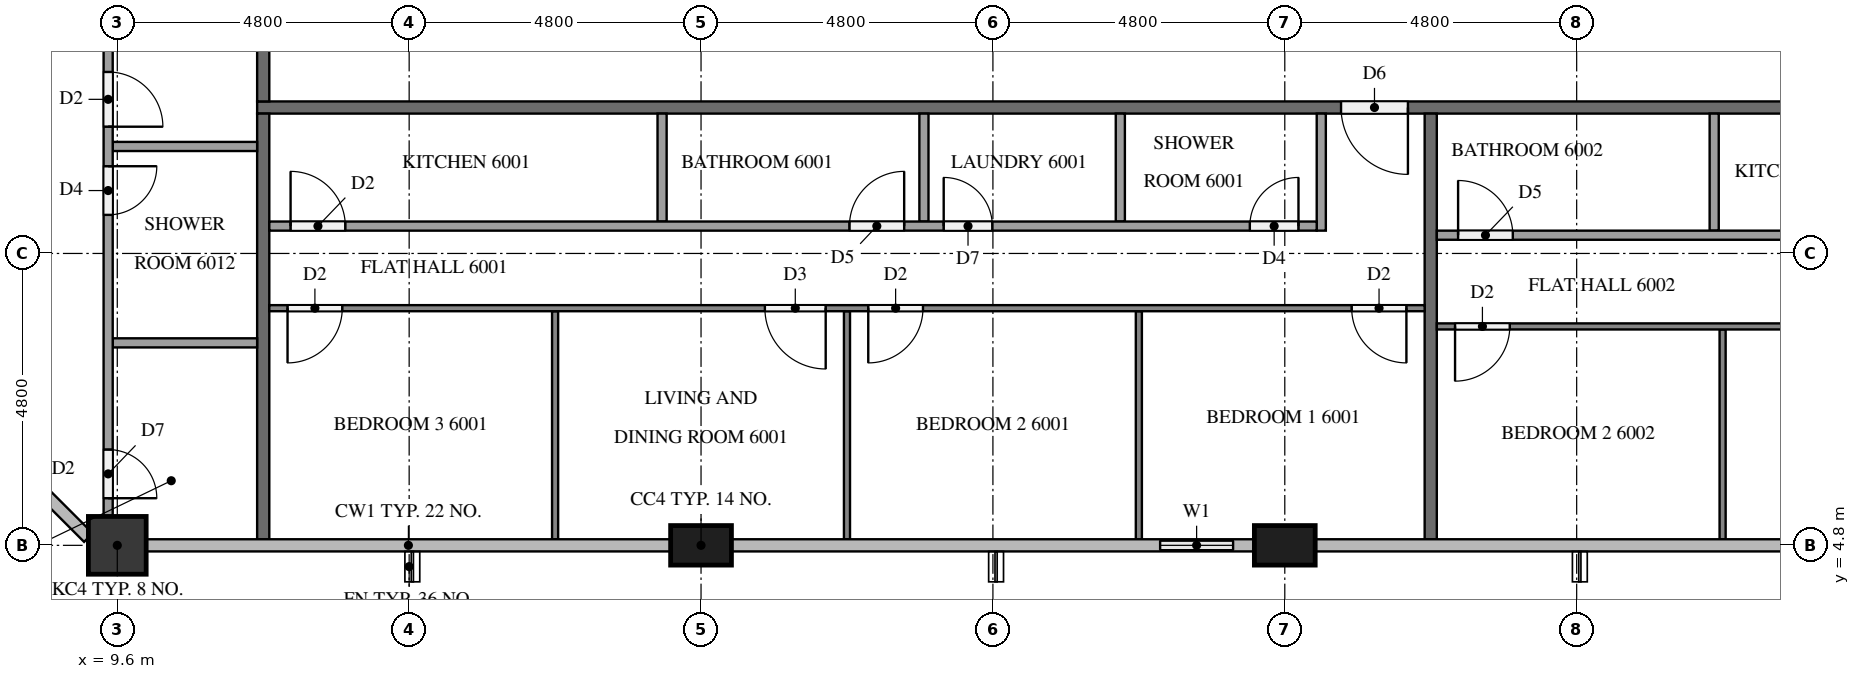
"""IFC4 building model, lengths in metres.
Left out: names, types, materials, properties, quantities, classifications, styles, units other than length and angle.
Written with IfcOpenShell. Run it as: python <this file> out.ifc"""

import sys

from ifc_helpers import new_model, si_unit, direction, frame, frame_2d, origin, origin_2d, place, context, subcontext, project, spatial, rectangle, extrude, element, fill, save


model = new_model("IFC4")
c1 = context("Model", 3, precision=1e-05, world=origin(), true_north=direction((0.0, 1.0)))
c2 = subcontext(c1, "Body", "Model", "MODEL_VIEW")
j1 = project(units=[si_unit("LENGTHUNIT", "METRE"), si_unit("PLANEANGLEUNIT", "RADIAN")], contexts=[c1])
p1 = place(None, origin())
s1 = spatial("IfcSite", under=j1, at=p1, CompositionType="ELEMENT")
p2 = place(p1, origin())
s2 = spatial("IfcBuilding", under=s1, at=p2, CompositionType="ELEMENT")
p3 = place(p2, frame((0.0, 0.0, 229.8)))
s3 = spatial("IfcBuildingStorey", under=s2, at=p3, CompositionType="ELEMENT", Elevation=229.8)
p4 = place(p3, frame((9.6, 4.8, 0.0), z_axis=(0.0, 0.0, 1.0), x_axis=(1.0, 0.0, 0.0)))
e1 = element("IfcColumn", 1, at=p4, inside=s3, PredefinedType="COLUMN", context=c2, shape_type="SweptSolid", body=[
    extrude(rectangle(XDim=0.95, YDim=0.95, at=origin_2d()), origin(), (0.0, 0.0, 1.0), 3.1),
])
for number, where, z_axis, x_axis in (
    (2, (19.2, 4.8, 0.0), (0.0, 0.0, 1.0), (1.0, 0.0, 0.0)),
    (3, (28.8, 4.8, 0.0), (0.0, 0.0, 1.0), (1.0, 0.0, 0.0)),
):
    element("IfcColumn", number, at=place(p3, frame(where, z_axis=z_axis, x_axis=x_axis)), inside=s3, PredefinedType="COLUMN", context=c2, shape_type="SweptSolid", body=[
        extrude(rectangle(XDim=1.0, YDim=0.65, at=origin_2d()), origin(), (0.0, 0.0, 1.0), 3.1),
    ])
p5 = place(p3, frame((26.4, 4.8, 0.0), z_axis=(0.0, 0.0, 1.0), x_axis=(1.0, 0.0, 0.0)))
e4 = element("IfcWall", 4, at=p5, inside=s3, PredefinedType="SOLIDWALL", context=c2, shape_type="SweptSolid", body=[
    extrude(rectangle(XDim=1.9, YDim=0.15, at=frame_2d((0.95, 0.0))), origin(), (0.0, 0.0, 1.0), 3.1),
])
p6 = place(p5, frame((0.35, 0.0, 0.9)))
e5 = element("IfcOpeningElement", 5, at=p6, cuts=e4, PredefinedType="OPENING", context=c2, shape_type="SweptSolid", body=[
    extrude(rectangle(XDim=1.2, YDim=1.4, at=frame_2d((0.6, 0.7))), frame((0.0, 0.085, 0.0), z_axis=(0.0, -1.0, 0.0), x_axis=(1.0, 0.0, 0.0)), (0.0, 0.0, 1.0), 0.17),
])
p7 = place(p3, frame((50.5, 12.0, 0.0), z_axis=(0.0, 0.0, 1.0), x_axis=(-1.0, 0.0, 0.0)))
e6 = element("IfcWall", 6, at=p7, inside=s3, PredefinedType="PARTITIONING", context=c2, shape_type="SweptSolid", body=[
    extrude(rectangle(XDim=38.6, YDim=0.2, at=frame_2d((19.3, 0.0))), origin(), (0.0, 0.0, 1.0), 3.1),
])
p8 = place(p7, frame((19.675, 0.0, 0.0)))
e7 = element("IfcOpeningElement", 7, at=p8, cuts=e6, PredefinedType="OPENING", context=c2, shape_type="SweptSolid", body=[
    extrude(rectangle(XDim=1.1, YDim=2.1, at=frame_2d((0.55, 1.05))), frame((0.0, 0.11, 0.0), z_axis=(0.0, -1.0, 0.0), x_axis=(1.0, 0.0, 0.0)), (0.0, 0.0, 1.0), 0.22),
])
p9 = place(p7, frame((2.925, 0.0, 0.0)))
e8 = element("IfcOpeningElement", 8, at=p9, cuts=e6, PredefinedType="OPENING", context=c2, shape_type="SweptSolid", body=[
    extrude(rectangle(XDim=1.0, YDim=2.1, at=frame_2d((0.5, 1.05))), frame((0.0, 0.11, 0.0), z_axis=(0.0, -1.0, 0.0), x_axis=(1.0, 0.0, 0.0)), (0.0, 0.0, 1.0), 0.22),
])
p10 = place(p7, frame((1.075, 0.0, 0.0)))
e9 = element("IfcOpeningElement", 9, at=p10, cuts=e6, PredefinedType="OPENING", context=c2, shape_type="SweptSolid", body=[
    extrude(rectangle(XDim=1.0, YDim=2.1, at=frame_2d((0.5, 1.05))), frame((0.0, 0.11, 0.0), z_axis=(0.0, -1.0, 0.0), x_axis=(1.0, 0.0, 0.0)), (0.0, 0.0, 1.0), 0.22),
])
p11 = place(p3, frame((12.0, 12.1, 0.0), z_axis=(0.0, 0.0, 1.0), x_axis=(0.0, 1.0, 0.0)))
e10 = element("IfcWall", 10, at=p11, inside=s3, PredefinedType="PARTITIONING", context=c2, shape_type="SweptSolid", body=[
    extrude(rectangle(XDim=28.6, YDim=0.2, at=frame_2d((14.3, 0.0))), origin(), (0.0, 0.0, 1.0), 3.1),
])
p12 = place(p11, frame((27.275, 0.0, 0.0)))
e11 = element("IfcOpeningElement", 11, at=p12, cuts=e10, PredefinedType="OPENING", context=c2, shape_type="SweptSolid", body=[
    extrude(rectangle(XDim=1.0, YDim=2.1, at=frame_2d((0.5, 1.05))), frame((0.0, 0.11, 0.0), z_axis=(0.0, -1.0, 0.0), x_axis=(1.0, 0.0, 0.0)), (0.0, 0.0, 1.0), 0.22),
])
p13 = place(p11, frame((20.075, 0.0, 0.0)))
e12 = element("IfcOpeningElement", 12, at=p13, cuts=e10, PredefinedType="OPENING", context=c2, shape_type="SweptSolid", body=[
    extrude(rectangle(XDim=1.0, YDim=2.1, at=frame_2d((0.5, 1.05))), frame((0.0, 0.11, 0.0), z_axis=(0.0, -1.0, 0.0), x_axis=(1.0, 0.0, 0.0)), (0.0, 0.0, 1.0), 0.22),
])
p14 = place(p11, frame((10.425, 0.0, 0.0)))
e13 = element("IfcOpeningElement", 13, at=p14, cuts=e10, PredefinedType="OPENING", context=c2, shape_type="SweptSolid", body=[
    extrude(rectangle(XDim=1.1, YDim=2.1, at=frame_2d((0.55, 1.05))), frame((0.0, 0.11, 0.0), z_axis=(0.0, -1.0, 0.0), x_axis=(1.0, 0.0, 0.0)), (0.0, 0.0, 1.0), 0.22),
])
for number, where, z_axis, x_axis in (
    (14, (31.2, 11.9, 0.0), (0.0, 0.0, 1.0), (0.0, -1.0, 0.0)),
    (15, (12.0, 4.9, 0.0), (0.0, 0.0, 1.0), (0.0, 1.0, 0.0)),
):
    element("IfcWall", number, at=place(p3, frame(where, z_axis=z_axis, x_axis=x_axis)), inside=s3, PredefinedType="PARTITIONING", context=c2, shape_type="SweptSolid", body=[
        extrude(rectangle(XDim=7.0, YDim=0.2, at=frame_2d((3.5, 0.0))), origin(), (0.0, 0.0, 1.0), 3.1),
    ])
for number, where, z_axis, x_axis in (
    (16, (26.4, 8.65, 0.0), (0.0, 0.0, 1.0), (0.0, -1.0, 0.0)),
    (17, (21.6, 8.65, 0.0), (0.0, 0.0, 1.0), (0.0, -1.0, 0.0)),
    (18, (16.8, 8.65, 0.0), (0.0, 0.0, 1.0), (0.0, -1.0, 0.0)),
):
    element("IfcWall", number, at=place(p3, frame(where, z_axis=z_axis, x_axis=x_axis)), inside=s3, PredefinedType="PARTITIONING", context=c2, shape_type="SweptSolid", body=[
        extrude(rectangle(XDim=3.75, YDim=0.1, at=frame_2d((1.875, 0.0))), origin(), (0.0, 0.0, 1.0), 3.1),
    ])
p15 = place(p3, frame((31.1, 8.7, 0.0), z_axis=(0.0, 0.0, 1.0), x_axis=(-1.0, 0.0, 0.0)))
e19 = element("IfcWall", 19, at=p15, inside=s3, PredefinedType="PARTITIONING", context=c2, shape_type="SweptSolid", body=[
    extrude(rectangle(XDim=19.0, YDim=0.1, at=frame_2d((9.5, 0.0))), origin(), (0.0, 0.0, 1.0), 3.1),
])
p16 = place(p15, frame((0.3, 0.0, 0.0)))
e20 = element("IfcOpeningElement", 20, at=p16, cuts=e19, PredefinedType="OPENING", context=c2, shape_type="SweptSolid", body=[
    extrude(rectangle(XDim=0.9, YDim=2.1, at=frame_2d((0.45, 1.05))), frame((0.0, 0.06, 0.0), z_axis=(0.0, -1.0, 0.0), x_axis=(1.0, 0.0, 0.0)), (0.0, 0.0, 1.0), 0.12),
])
p17 = place(p15, frame((8.25, 0.0, 0.0)))
e21 = element("IfcOpeningElement", 21, at=p17, cuts=e19, PredefinedType="OPENING", context=c2, shape_type="SweptSolid", body=[
    extrude(rectangle(XDim=0.9, YDim=2.1, at=frame_2d((0.45, 1.05))), frame((0.0, 0.06, 0.0), z_axis=(0.0, -1.0, 0.0), x_axis=(1.0, 0.0, 0.0)), (0.0, 0.0, 1.0), 0.12),
])
p18 = place(p15, frame((9.85, 0.0, 0.0)))
e22 = element("IfcOpeningElement", 22, at=p18, cuts=e19, PredefinedType="OPENING", context=c2, shape_type="SweptSolid", body=[
    extrude(rectangle(XDim=1.0, YDim=2.1, at=frame_2d((0.5, 1.05))), frame((0.0, 0.06, 0.0), z_axis=(0.0, -1.0, 0.0), x_axis=(1.0, 0.0, 0.0)), (0.0, 0.0, 1.0), 0.12),
])
p19 = place(p15, frame((17.8, 0.0, 0.0)))
e23 = element("IfcOpeningElement", 23, at=p19, cuts=e19, PredefinedType="OPENING", context=c2, shape_type="SweptSolid", body=[
    extrude(rectangle(XDim=0.9, YDim=2.1, at=frame_2d((0.45, 1.05))), frame((0.0, 0.06, 0.0), z_axis=(0.0, -1.0, 0.0), x_axis=(1.0, 0.0, 0.0)), (0.0, 0.0, 1.0), 0.12),
])
for number, where, z_axis, x_axis in (
    (24, (26.095, 11.9, 0.0), (0.0, 0.0, 1.0), (0.0, -1.0, 0.0)),
    (25, (22.865, 11.9, 0.0), (0.0, 0.0, 1.0), (0.0, -1.0, 0.0)),
    (26, (18.559, 11.9, 0.0), (0.0, 0.0, 1.0), (0.0, -1.0, 0.0)),
):
    element("IfcWall", number, at=place(p3, frame(where, z_axis=z_axis, x_axis=x_axis)), inside=s3, PredefinedType="PARTITIONING", context=c2, shape_type="SweptSolid", body=[
        extrude(rectangle(XDim=1.775, YDim=0.15, at=frame_2d((0.887, 0.0))), origin(), (0.0, 0.0, 1.0), 3.1),
    ])
p20 = place(p3, frame((29.4, 11.9, 0.0), z_axis=(0.0, 0.0, 1.0), x_axis=(0.0, -1.0, 0.0)))
e27 = element("IfcWall", 27, at=p20, inside=s3, PredefinedType="PARTITIONING", context=c2, shape_type="SweptSolid", body=[
    extrude(rectangle(XDim=1.925, YDim=0.15, at=frame_2d((0.962, 0.0))), origin(), (0.0, 0.0, 1.0), 3.1),
])
p21 = place(p3, frame((12.1, 10.05, 0.0), z_axis=(0.0, 0.0, 1.0), x_axis=(1.0, 0.0, 0.0)))
e28 = element("IfcWall", 28, at=p21, inside=s3, PredefinedType="PARTITIONING", context=c2, shape_type="SweptSolid", body=[
    extrude(rectangle(XDim=17.225, YDim=0.15, at=frame_2d((8.612, 0.0))), origin(), (0.0, 0.0, 1.0), 3.1),
])
p22 = place(p21, frame((16.125, 0.0, 0.0)))
e29 = element("IfcOpeningElement", 29, at=p22, cuts=e28, PredefinedType="OPENING", context=c2, shape_type="SweptSolid", body=[
    extrude(rectangle(XDim=0.8, YDim=2.1, at=frame_2d((0.4, 1.05))), frame((0.0, 0.085, 0.0), z_axis=(0.0, -1.0, 0.0), x_axis=(1.0, 0.0, 0.0)), (0.0, 0.0, 1.0), 0.17),
])
p23 = place(p21, frame((11.091, 0.0, 0.0)))
e30 = element("IfcOpeningElement", 30, at=p23, cuts=e28, PredefinedType="OPENING", context=c2, shape_type="SweptSolid", body=[
    extrude(rectangle(XDim=0.8, YDim=2.1, at=frame_2d((0.4, 1.05))), frame((0.0, 0.085, 0.0), z_axis=(0.0, -1.0, 0.0), x_axis=(1.0, 0.0, 0.0)), (0.0, 0.0, 1.0), 0.17),
])
p24 = place(p21, frame((9.541, 0.0, 0.0)))
e31 = element("IfcOpeningElement", 31, at=p24, cuts=e28, PredefinedType="OPENING", context=c2, shape_type="SweptSolid", body=[
    extrude(rectangle(XDim=0.9, YDim=2.1, at=frame_2d((0.45, 1.05))), frame((0.0, 0.085, 0.0), z_axis=(0.0, -1.0, 0.0), x_axis=(1.0, 0.0, 0.0)), (0.0, 0.0, 1.0), 0.17),
])
p25 = place(p21, frame((0.35, 0.0, 0.0)))
e32 = element("IfcOpeningElement", 32, at=p25, cuts=e28, PredefinedType="OPENING", context=c2, shape_type="SweptSolid", body=[
    extrude(rectangle(XDim=0.9, YDim=2.1, at=frame_2d((0.45, 1.05))), frame((0.0, 0.085, 0.0), z_axis=(0.0, -1.0, 0.0), x_axis=(1.0, 0.0, 0.0)), (0.0, 0.0, 1.0), 0.17),
])
p26 = place(p3, frame((36.0, 8.35, 0.0), z_axis=(0.0, 0.0, 1.0), x_axis=(0.0, -1.0, 0.0)))
e33 = element("IfcWall", 33, at=p26, inside=s3, PredefinedType="PARTITIONING", context=c2, shape_type="SweptSolid", body=[
    extrude(rectangle(XDim=3.45, YDim=0.1, at=frame_2d((1.725, 0.0))), origin(), (0.0, 0.0, 1.0), 3.1),
])
p27 = place(p3, frame((47.9, 8.4, 0.0), z_axis=(0.0, 0.0, 1.0), x_axis=(-1.0, 0.0, 0.0)))
e34 = element("IfcWall", 34, at=p27, inside=s3, PredefinedType="PARTITIONING", context=c2, shape_type="SweptSolid", body=[
    extrude(rectangle(XDim=16.6, YDim=0.1, at=frame_2d((8.3, 0.0))), origin(), (0.0, 0.0, 1.0), 3.1),
])
p28 = place(p27, frame((3.45, 0.0, 0.0)))
e35 = element("IfcOpeningElement", 35, at=p28, cuts=e34, PredefinedType="OPENING", context=c2, shape_type="SweptSolid", body=[
    extrude(rectangle(XDim=0.9, YDim=2.1, at=frame_2d((0.45, 1.05))), frame((0.0, 0.06, 0.0), z_axis=(0.0, -1.0, 0.0), x_axis=(1.0, 0.0, 0.0)), (0.0, 0.0, 1.0), 0.12),
])
p29 = place(p27, frame((5.05, 0.0, 0.0)))
e36 = element("IfcOpeningElement", 36, at=p29, cuts=e34, PredefinedType="OPENING", context=c2, shape_type="SweptSolid", body=[
    extrude(rectangle(XDim=1.0, YDim=2.1, at=frame_2d((0.5, 1.05))), frame((0.0, 0.06, 0.0), z_axis=(0.0, -1.0, 0.0), x_axis=(1.0, 0.0, 0.0)), (0.0, 0.0, 1.0), 0.12),
])
p30 = place(p27, frame((15.4, 0.0, 0.0)))
e37 = element("IfcOpeningElement", 37, at=p30, cuts=e34, PredefinedType="OPENING", context=c2, shape_type="SweptSolid", body=[
    extrude(rectangle(XDim=0.9, YDim=2.1, at=frame_2d((0.45, 1.05))), frame((0.0, 0.06, 0.0), z_axis=(0.0, -1.0, 0.0), x_axis=(1.0, 0.0, 0.0)), (0.0, 0.0, 1.0), 0.12),
])
p31 = place(p3, frame((35.862, 11.9, 0.0), z_axis=(0.0, 0.0, 1.0), x_axis=(0.0, -1.0, 0.0)))
e38 = element("IfcWall", 38, at=p31, inside=s3, PredefinedType="PARTITIONING", context=c2, shape_type="SweptSolid", body=[
    extrude(rectangle(XDim=1.925, YDim=0.15, at=frame_2d((0.962, 0.0))), origin(), (0.0, 0.0, 1.0), 3.1),
])
p32 = place(p3, frame((31.3, 9.9, 0.0), z_axis=(0.0, 0.0, 1.0), x_axis=(1.0, 0.0, 0.0)))
e39 = element("IfcWall", 39, at=p32, inside=s3, PredefinedType="PARTITIONING", context=c2, shape_type="SweptSolid", body=[
    extrude(rectangle(XDim=14.825, YDim=0.15, at=frame_2d((7.413, 0.0))), origin(), (0.0, 0.0, 1.0), 3.1),
])
p33 = place(p32, frame((11.729, 0.0, 0.0)))
e40 = element("IfcOpeningElement", 40, at=p33, cuts=e39, PredefinedType="OPENING", context=c2, shape_type="SweptSolid", body=[
    extrude(rectangle(XDim=0.8, YDim=2.1, at=frame_2d((0.4, 1.05))), frame((0.0, 0.085, 0.0), z_axis=(0.0, -1.0, 0.0), x_axis=(1.0, 0.0, 0.0)), (0.0, 0.0, 1.0), 0.17),
])
p34 = place(p32, frame((10.179, 0.0, 0.0)))
e41 = element("IfcOpeningElement", 41, at=p34, cuts=e39, PredefinedType="OPENING", context=c2, shape_type="SweptSolid", body=[
    extrude(rectangle(XDim=0.9, YDim=2.1, at=frame_2d((0.45, 1.05))), frame((0.0, 0.085, 0.0), z_axis=(0.0, -1.0, 0.0), x_axis=(1.0, 0.0, 0.0)), (0.0, 0.0, 1.0), 0.17),
])
p35 = place(p32, frame((0.35, 0.0, 0.0)))
e42 = element("IfcOpeningElement", 42, at=p35, cuts=e39, PredefinedType="OPENING", context=c2, shape_type="SweptSolid", body=[
    extrude(rectangle(XDim=0.9, YDim=2.1, at=frame_2d((0.45, 1.05))), frame((0.0, 0.085, 0.0), z_axis=(0.0, -1.0, 0.0), x_axis=(1.0, 0.0, 0.0)), (0.0, 0.0, 1.0), 0.17),
])
for number, where, z_axis, x_axis in (
    (43, (11.9, 11.359, 0.0), (0.0, 0.0, 1.0), (-1.0, 0.0, 0.0)),
    (44, (11.9, 8.13, 0.0), (0.0, 0.0, 1.0), (-1.0, 0.0, 0.0)),
):
    element("IfcWall", number, at=place(p3, frame(where, z_axis=z_axis, x_axis=x_axis)), inside=s3, PredefinedType="PARTITIONING", context=c2, shape_type="SweptSolid", body=[
        extrude(rectangle(XDim=2.375, YDim=0.15, at=frame_2d((1.188, 0.0))), origin(), (0.0, 0.0, 1.0), 3.1),
    ])
p36 = place(p3, frame((9.45, 22.125, 0.0), z_axis=(0.0, 0.0, 1.0), x_axis=(0.0, -1.0, 0.0)))
e45 = element("IfcWall", 45, at=p36, inside=s3, PredefinedType="PARTITIONING", context=c2, shape_type="SweptSolid", body=[
    extrude(rectangle(XDim=16.85, YDim=0.15, at=frame_2d((8.425, 0.0))), origin(), (0.0, 0.0, 1.0), 3.1),
])
p37 = place(p36, frame((0.3, 0.0, 0.0)))
e46 = element("IfcOpeningElement", 46, at=p37, cuts=e45, PredefinedType="OPENING", context=c2, shape_type="SweptSolid", body=[
    extrude(rectangle(XDim=0.9, YDim=2.1, at=frame_2d((0.45, 1.05))), frame((0.0, 0.085, 0.0), z_axis=(0.0, -1.0, 0.0), x_axis=(1.0, 0.0, 0.0)), (0.0, 0.0, 1.0), 0.17),
])
p38 = place(p36, frame((9.541, 0.0, 0.0)))
e47 = element("IfcOpeningElement", 47, at=p38, cuts=e45, PredefinedType="OPENING", context=c2, shape_type="SweptSolid", body=[
    extrude(rectangle(XDim=0.9, YDim=2.1, at=frame_2d((0.45, 1.05))), frame((0.0, 0.085, 0.0), z_axis=(0.0, -1.0, 0.0), x_axis=(1.0, 0.0, 0.0)), (0.0, 0.0, 1.0), 0.17),
])
p39 = place(p36, frame((11.091, 0.0, 0.0)))
e48 = element("IfcOpeningElement", 48, at=p39, cuts=e45, PredefinedType="OPENING", context=c2, shape_type="SweptSolid", body=[
    extrude(rectangle(XDim=0.8, YDim=2.1, at=frame_2d((0.4, 1.05))), frame((0.0, 0.085, 0.0), z_axis=(0.0, -1.0, 0.0), x_axis=(1.0, 0.0, 0.0)), (0.0, 0.0, 1.0), 0.17),
])
p40 = place(p36, frame((15.75, 0.0, 0.0)))
e49 = element("IfcOpeningElement", 49, at=p40, cuts=e45, PredefinedType="OPENING", context=c2, shape_type="SweptSolid", body=[
    extrude(rectangle(XDim=0.8, YDim=2.1, at=frame_2d((0.4, 1.05))), frame((0.0, 0.085, 0.0), z_axis=(0.0, -1.0, 0.0), x_axis=(1.0, 0.0, 0.0)), (0.0, 0.0, 1.0), 0.17),
])
p41 = place(p6, origin())
e50 = element("IfcWindow", 50, at=p41, inside=s3, PartitioningType="SINGLE_PANEL", PredefinedType="WINDOW", context=c2, shape_type="SweptSolid", body=[
    extrude(rectangle(XDim=1.2, YDim=1.4, at=frame_2d((0.6, 0.7))), frame((0.0, 0.03, 0.0), z_axis=(0.0, -1.0, 0.0), x_axis=(1.0, 0.0, 0.0)), (0.0, 0.0, 1.0), 0.06),
])
fill(e5, e50)
p42 = place(p8, origin())
e51 = element("IfcDoor", 51, at=p42, inside=s3, OperationType="SINGLE_SWING_LEFT", PredefinedType="DOOR", context=c2, shape_type="SweptSolid", body=[
    extrude(rectangle(XDim=1.1, YDim=2.1, at=frame_2d((0.55, 1.05))), frame((0.0, 0.025, 0.0), z_axis=(0.0, -1.0, 0.0), x_axis=(1.0, 0.0, 0.0)), (0.0, 0.0, 1.0), 0.05),
])
fill(e7, e51)
p43 = place(p16, origin())
e52 = element("IfcDoor", 52, at=p43, inside=s3, OperationType="SINGLE_SWING_LEFT", PredefinedType="DOOR", context=c2, shape_type="SweptSolid", body=[
    extrude(rectangle(XDim=0.9, YDim=2.1, at=frame_2d((0.45, 1.05))), frame((0.0, 0.025, 0.0), z_axis=(0.0, -1.0, 0.0), x_axis=(1.0, 0.0, 0.0)), (0.0, 0.0, 1.0), 0.05),
])
fill(e20, e52)
p44 = place(p17, origin())
e53 = element("IfcDoor", 53, at=p44, inside=s3, OperationType="SINGLE_SWING_RIGHT", PredefinedType="DOOR", context=c2, shape_type="SweptSolid", body=[
    extrude(rectangle(XDim=0.9, YDim=2.1, at=frame_2d((0.45, 1.05))), frame((0.0, 0.025, 0.0), z_axis=(0.0, -1.0, 0.0), x_axis=(1.0, 0.0, 0.0)), (0.0, 0.0, 1.0), 0.05),
])
fill(e21, e53)
p45 = place(p18, origin())
e54 = element("IfcDoor", 54, at=p45, inside=s3, OperationType="SINGLE_SWING_LEFT", PredefinedType="DOOR", context=c2, shape_type="SweptSolid", body=[
    extrude(rectangle(XDim=1.0, YDim=2.1, at=frame_2d((0.5, 1.05))), frame((0.0, 0.025, 0.0), z_axis=(0.0, -1.0, 0.0), x_axis=(1.0, 0.0, 0.0)), (0.0, 0.0, 1.0), 0.05),
])
fill(e22, e54)
p46 = place(p19, origin())
e55 = element("IfcDoor", 55, at=p46, inside=s3, OperationType="SINGLE_SWING_RIGHT", PredefinedType="DOOR", context=c2, shape_type="SweptSolid", body=[
    extrude(rectangle(XDim=0.9, YDim=2.1, at=frame_2d((0.45, 1.05))), frame((0.0, 0.025, 0.0), z_axis=(0.0, -1.0, 0.0), x_axis=(1.0, 0.0, 0.0)), (0.0, 0.0, 1.0), 0.05),
])
fill(e23, e55)
p47 = place(p22, origin())
e56 = element("IfcDoor", 56, at=p47, inside=s3, OperationType="SINGLE_SWING_RIGHT", PredefinedType="DOOR", context=c2, shape_type="SweptSolid", body=[
    extrude(rectangle(XDim=0.8, YDim=2.1, at=frame_2d((0.4, 1.05))), frame((0.0, 0.025, 0.0), z_axis=(0.0, -1.0, 0.0), x_axis=(1.0, 0.0, 0.0)), (0.0, 0.0, 1.0), 0.05),
])
fill(e29, e56)
p48 = place(p23, origin())
e57 = element("IfcDoor", 57, at=p48, inside=s3, OperationType="SINGLE_SWING_LEFT", PredefinedType="DOOR", context=c2, shape_type="SweptSolid", body=[
    extrude(rectangle(XDim=0.8, YDim=2.1, at=frame_2d((0.4, 1.05))), frame((0.0, 0.025, 0.0), z_axis=(0.0, -1.0, 0.0), x_axis=(1.0, 0.0, 0.0)), (0.0, 0.0, 1.0), 0.05),
])
fill(e30, e57)
p49 = place(p24, origin())
e58 = element("IfcDoor", 58, at=p49, inside=s3, OperationType="SINGLE_SWING_RIGHT", PredefinedType="DOOR", context=c2, shape_type="SweptSolid", body=[
    extrude(rectangle(XDim=0.9, YDim=2.1, at=frame_2d((0.45, 1.05))), frame((0.0, 0.025, 0.0), z_axis=(0.0, -1.0, 0.0), x_axis=(1.0, 0.0, 0.0)), (0.0, 0.0, 1.0), 0.05),
])
fill(e31, e58)
p50 = place(p25, origin())
e59 = element("IfcDoor", 59, at=p50, inside=s3, OperationType="SINGLE_SWING_LEFT", PredefinedType="DOOR", context=c2, shape_type="SweptSolid", body=[
    extrude(rectangle(XDim=0.9, YDim=2.1, at=frame_2d((0.45, 1.05))), frame((0.0, 0.025, 0.0), z_axis=(0.0, -1.0, 0.0), x_axis=(1.0, 0.0, 0.0)), (0.0, 0.0, 1.0), 0.05),
])
fill(e32, e59)
p51 = place(p30, origin())
e60 = element("IfcDoor", 60, at=p51, inside=s3, OperationType="SINGLE_SWING_RIGHT", PredefinedType="DOOR", context=c2, shape_type="SweptSolid", body=[
    extrude(rectangle(XDim=0.9, YDim=2.1, at=frame_2d((0.45, 1.05))), frame((0.0, 0.025, 0.0), z_axis=(0.0, -1.0, 0.0), x_axis=(1.0, 0.0, 0.0)), (0.0, 0.0, 1.0), 0.05),
])
fill(e37, e60)
p52 = place(p35, origin())
e61 = element("IfcDoor", 61, at=p52, inside=s3, OperationType="SINGLE_SWING_LEFT", PredefinedType="DOOR", context=c2, shape_type="SweptSolid", body=[
    extrude(rectangle(XDim=0.9, YDim=2.1, at=frame_2d((0.45, 1.05))), frame((0.0, 0.025, 0.0), z_axis=(0.0, -1.0, 0.0), x_axis=(1.0, 0.0, 0.0)), (0.0, 0.0, 1.0), 0.05),
])
fill(e42, e61)
p53 = place(p38, origin())
e62 = element("IfcDoor", 62, at=p53, inside=s3, OperationType="SINGLE_SWING_RIGHT", PredefinedType="DOOR", context=c2, shape_type="SweptSolid", body=[
    extrude(rectangle(XDim=0.9, YDim=2.1, at=frame_2d((0.45, 1.05))), frame((0.0, 0.025, 0.0), z_axis=(0.0, -1.0, 0.0), x_axis=(1.0, 0.0, 0.0)), (0.0, 0.0, 1.0), 0.05),
])
fill(e47, e62)
p54 = place(p39, origin())
e63 = element("IfcDoor", 63, at=p54, inside=s3, OperationType="SINGLE_SWING_LEFT", PredefinedType="DOOR", context=c2, shape_type="SweptSolid", body=[
    extrude(rectangle(XDim=0.8, YDim=2.1, at=frame_2d((0.4, 1.05))), frame((0.0, 0.025, 0.0), z_axis=(0.0, -1.0, 0.0), x_axis=(1.0, 0.0, 0.0)), (0.0, 0.0, 1.0), 0.05),
])
fill(e48, e63)
p55 = place(p40, origin())
e64 = element("IfcDoor", 64, at=p55, inside=s3, OperationType="SINGLE_SWING_RIGHT", PredefinedType="DOOR", context=c2, shape_type="SweptSolid", body=[
    extrude(rectangle(XDim=0.8, YDim=2.1, at=frame_2d((0.4, 1.05))), frame((0.0, 0.025, 0.0), z_axis=(0.0, -1.0, 0.0), x_axis=(1.0, 0.0, 0.0)), (0.0, 0.0, 1.0), 0.05),
])
fill(e49, e64)
save(model, sys.argv[1])
